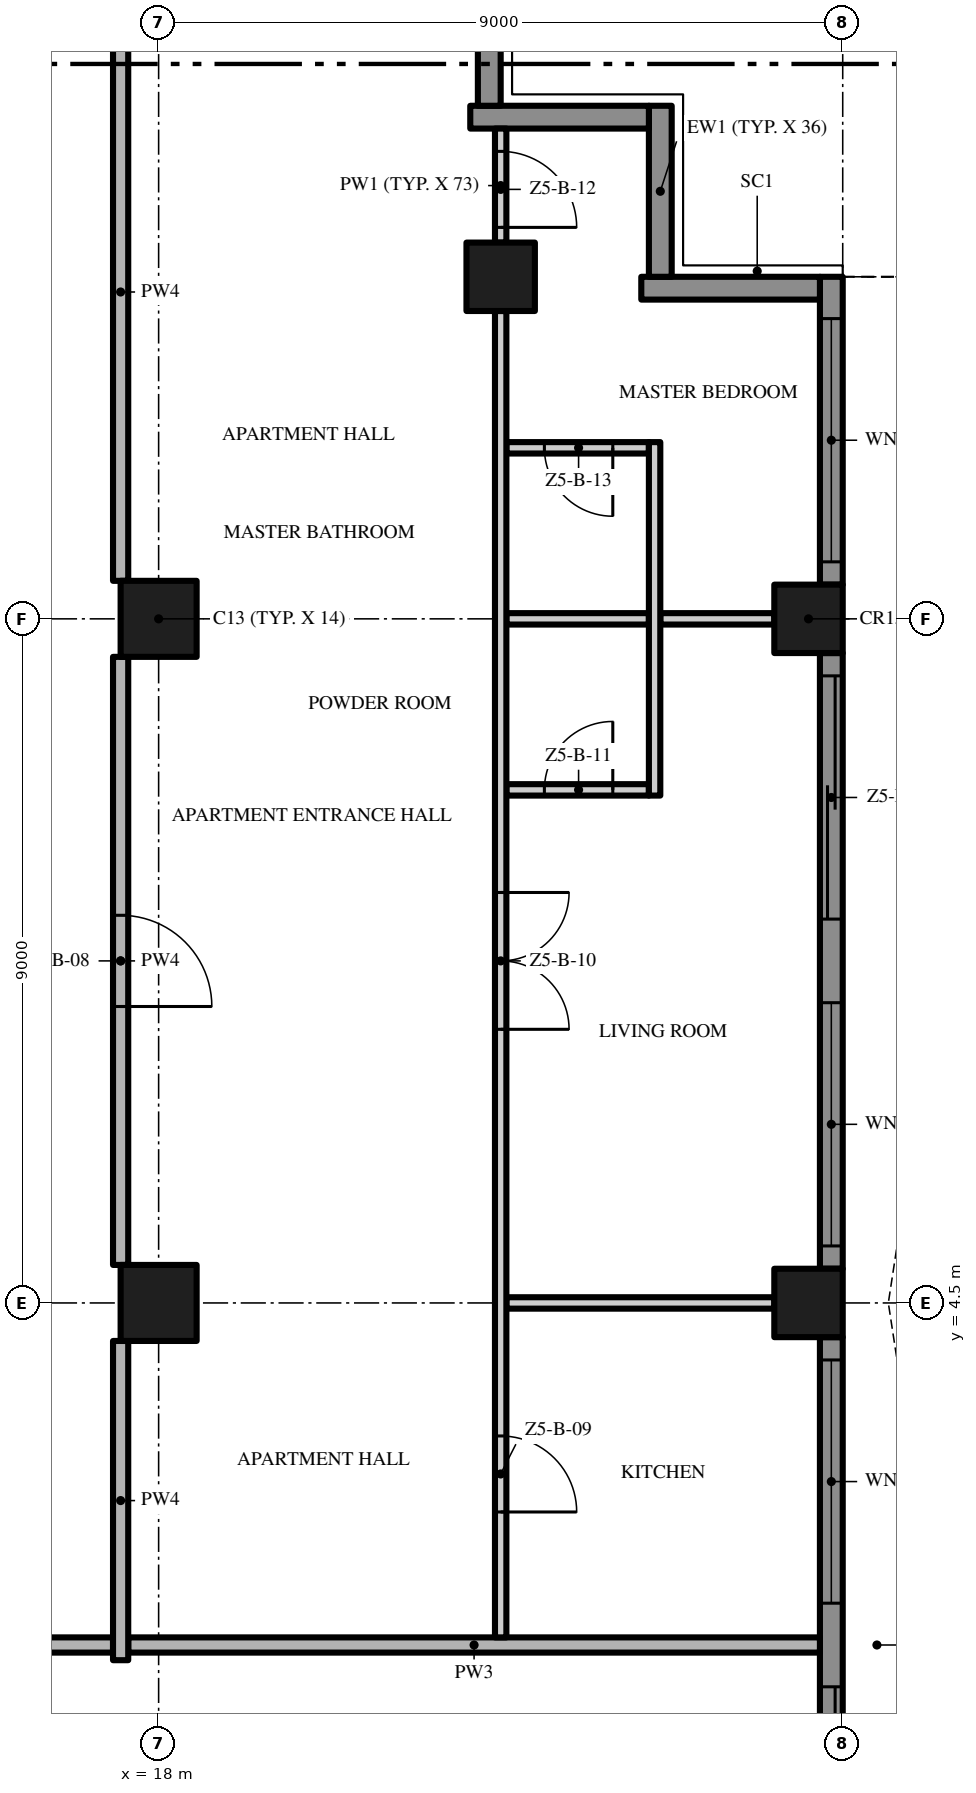
"""IFC4 building model, lengths in metres.
Left out: names, types, materials, properties, quantities, classifications, styles, units other than length and angle.
Written with IfcOpenShell. Run it as: python <this file> out.ifc"""

import sys

from ifc_helpers import new_model, si_unit, direction, frame, frame_2d, origin, origin_2d, place, context, subcontext, project, spatial, polyline, rectangle, outline, extrude, element, fill, save


model = new_model("IFC4")
c1 = context("Model", 3, precision=1e-05, world=origin(), true_north=direction((0.0, 1.0)))
c2 = subcontext(c1, "Body", "Model", "MODEL_VIEW")
j1 = project(units=[si_unit("LENGTHUNIT", "METRE"), si_unit("PLANEANGLEUNIT", "RADIAN")], contexts=[c1])
p1 = place(None, origin())
s1 = spatial("IfcSite", under=j1, at=p1, CompositionType="ELEMENT")
p2 = place(p1, origin())
s2 = spatial("IfcBuilding", under=s1, at=p2, CompositionType="ELEMENT")
p3 = place(p2, frame((0.0, 0.0, 250.2)))
s3 = spatial("IfcBuildingStorey", under=s2, at=p3, CompositionType="ELEMENT", Elevation=250.2)
for number, where, z_axis, x_axis in (
    (1, (18.0, 13.5, 0.0), (0.0, 0.0, 1.0), (1.0, 0.0, 0.0)),
    (2, (18.0, 4.5, 0.0), (0.0, 0.0, 1.0), (1.0, 0.0, 0.0)),
):
    element("IfcColumn", number, at=place(p3, frame(where, z_axis=z_axis, x_axis=x_axis)), inside=s3, PredefinedType="COLUMN", context=c2, shape_type="SweptSolid", body=[
        extrude(rectangle(XDim=1.0, YDim=1.0, at=origin_2d()), origin(), (0.0, 0.0, 1.0), 3.5),
    ])
for number, where, z_axis, x_axis in (
    (3, (26.55, 13.5, 0.0), (0.0, 0.0, 1.0), (1.0, 0.0, 0.0)),
    (4, (22.5, 18.0, 0.0), (0.0, 0.0, 1.0), (1.0, 0.0, 0.0)),
    (5, (26.55, 4.5, 0.0), (0.0, 0.0, 1.0), (1.0, 0.0, 0.0)),
):
    element("IfcColumn", number, at=place(p3, frame(where, z_axis=z_axis, x_axis=x_axis)), inside=s3, PredefinedType="COLUMN", context=c2, shape_type="SweptSolid", body=[
        extrude(rectangle(XDim=0.9, YDim=0.9, at=origin_2d()), origin(), (0.0, 0.0, 1.0), 3.5),
    ])
p4 = place(p3, frame((26.85, 4.05, 0.0), z_axis=(0.0, 0.0, 1.0), x_axis=(0.0, -1.0, 0.0)))
e6 = element("IfcWall", 6, at=p4, inside=s3, PredefinedType="SOLIDWALL", context=c2, shape_type="SweptSolid", body=[
    extrude(rectangle(XDim=8.1, YDim=0.3, at=frame_2d((4.05, 0.0))), origin(), (0.0, 0.0, 1.0), 3.5),
])
p5 = place(p4, frame((4.6, 0.0, 0.0)))
e7 = element("IfcOpeningElement", 7, at=p5, cuts=e6, PredefinedType="OPENING", context=c2, shape_type="SweptSolid", body=[
    extrude(rectangle(XDim=3.2, YDim=2.4, at=frame_2d((1.6, 1.2))), frame((0.0, 0.16, 0.0), z_axis=(0.0, -1.0, 0.0), x_axis=(1.0, 0.0, 0.0)), (0.0, 0.0, 1.0), 0.32),
])
p6 = place(p4, frame((0.3, 0.0, 0.45)))
e8 = element("IfcOpeningElement", 8, at=p6, cuts=e6, PredefinedType="OPENING", context=c2, shape_type="SweptSolid", body=[
    extrude(rectangle(XDim=3.2, YDim=2.65, at=frame_2d((1.6, 1.325))), frame((0.0, 0.16, 0.0), z_axis=(0.0, -1.0, 0.0), x_axis=(1.0, 0.0, 0.0)), (0.0, 0.0, 1.0), 0.32),
])
p7 = place(p3, frame((26.85, 13.05, 0.0), z_axis=(0.0, 0.0, 1.0), x_axis=(0.0, -1.0, 0.0)))
e9 = element("IfcWall", 9, at=p7, inside=s3, PredefinedType="SOLIDWALL", context=c2, shape_type="SweptSolid", body=[
    extrude(rectangle(XDim=8.1, YDim=0.3, at=frame_2d((4.05, 0.0))), origin(), (0.0, 0.0, 1.0), 3.5),
])
p8 = place(p7, frame((4.6, 0.0, 0.45)))
e10 = element("IfcOpeningElement", 10, at=p8, cuts=e9, PredefinedType="OPENING", context=c2, shape_type="SweptSolid", body=[
    extrude(rectangle(XDim=3.2, YDim=2.65, at=frame_2d((1.6, 1.325))), frame((0.0, 0.16, 0.0), z_axis=(0.0, -1.0, 0.0), x_axis=(1.0, 0.0, 0.0)), (0.0, 0.0, 1.0), 0.32),
])
p9 = place(p7, frame((0.3, 0.0, 0.0)))
e11 = element("IfcOpeningElement", 11, at=p9, cuts=e9, PredefinedType="OPENING", context=c2, shape_type="SweptSolid", body=[
    extrude(rectangle(XDim=3.2, YDim=2.4, at=frame_2d((1.6, 1.2))), frame((0.0, 0.16, 0.0), z_axis=(0.0, -1.0, 0.0), x_axis=(1.0, 0.0, 0.0)), (0.0, 0.0, 1.0), 0.32),
])
p10 = place(p3, frame((26.85, 18.0, 0.0), z_axis=(0.0, 0.0, 1.0), x_axis=(0.0, -1.0, 0.0)))
e12 = element("IfcWall", 12, at=p10, inside=s3, PredefinedType="SOLIDWALL", context=c2, shape_type="SweptSolid", body=[
    extrude(rectangle(XDim=4.05, YDim=0.3, at=frame_2d((2.025, 0.0))), origin(), (0.0, 0.0, 1.0), 3.5),
])
p11 = place(p10, frame((0.55, 0.0, 0.45)))
e13 = element("IfcOpeningElement", 13, at=p11, cuts=e12, PredefinedType="OPENING", context=c2, shape_type="SweptSolid", body=[
    extrude(rectangle(XDim=3.2, YDim=2.65, at=frame_2d((1.6, 1.325))), frame((0.0, 0.16, 0.0), z_axis=(0.0, -1.0, 0.0), x_axis=(1.0, 0.0, 0.0)), (0.0, 0.0, 1.0), 0.32),
])
p12 = place(p3, frame((24.35, 17.85, 0.0), z_axis=(0.0, 0.0, 1.0), x_axis=(1.0, 0.0, 0.0)))
e14 = element("IfcWall", 14, at=p12, inside=s3, PredefinedType="SOLIDWALL", context=c2, shape_type="SweptSolid", body=[
    extrude(rectangle(XDim=2.35, YDim=0.3, at=frame_2d((1.175, 0.0))), origin(), (0.0, 0.0, 1.0), 3.5),
])
p13 = place(p3, frame((24.6, 20.25, 0.0), z_axis=(0.0, 0.0, 1.0), x_axis=(0.0, -1.0, 0.0)))
e15 = element("IfcWall", 15, at=p13, inside=s3, PredefinedType="SOLIDWALL", context=c2, shape_type="SweptSolid", body=[
    extrude(rectangle(XDim=2.25, YDim=0.3, at=frame_2d((1.125, 0.0))), origin(), (0.0, 0.0, 1.0), 3.5),
])
p14 = place(p3, frame((22.1, 20.1, 0.0), z_axis=(0.0, 0.0, 1.0), x_axis=(1.0, 0.0, 0.0)))
e16 = element("IfcWall", 16, at=p14, inside=s3, PredefinedType="SOLIDWALL", context=c2, shape_type="SweptSolid", body=[
    extrude(rectangle(XDim=2.35, YDim=0.3, at=frame_2d((1.175, 0.0))), origin(), (0.0, 0.0, 1.0), 3.5),
])
p15 = place(p3, frame((22.35, 22.5, 0.0), z_axis=(0.0, 0.0, 1.0), x_axis=(0.0, -1.0, 0.0)))
e17 = element("IfcWall", 17, at=p15, inside=s3, PredefinedType="SOLIDWALL", context=c2, shape_type="SweptSolid", body=[
    extrude(rectangle(XDim=2.25, YDim=0.3, at=frame_2d((1.125, 0.0))), origin(), (0.0, 0.0, 1.0), 3.5),
])
p16 = place(p3, origin())
e18 = element("IfcWall", 18, at=p16, inside=s3, PredefinedType="USERDEFINED", context=c2, shape_type="SweptSolid", body=[
    extrude(outline(polyline([(30.0, -18.0), (29.771, -16.5), (29.171, -15.0), (28.429, -13.5), (27.829, -12.0), (27.6, -10.5), (27.829, -9.0), (28.429, -7.5), (29.171, -6.0), (29.771, -4.5), (30.0, -3.0), (29.771, -1.5), (29.171, 0.0), (28.429, 1.5), (27.829, 3.0), (27.6, 4.5), (27.829, 6.0), (28.429, 7.5), (29.171, 9.0), (29.771, 10.5), (30.0, 12.0), (29.771, 13.5), (29.171, 15.0), (28.429, 16.5), (27.829, 18.0), (27.597, 17.907), (28.201, 16.398), (28.942, 14.898), (29.528, 13.434), (29.747, 12.0), (29.528, 10.566), (28.942, 9.102), (28.201, 7.602), (27.586, 6.066), (27.347, 4.5), (27.586, 2.934), (28.201, 1.398), (28.942, -0.102), (29.528, -1.566), (29.747, -3.0), (29.528, -4.434), (28.942, -5.898), (28.201, -7.398), (27.586, -8.934), (27.347, -10.5), (27.586, -12.066), (28.201, -13.602), (28.942, -15.102), (29.528, -16.566), (29.753, -18.038), (30.0, -18.0)])), origin(), (0.0, 0.0, 1.0), 0.9),
])
p17 = place(p3, frame((17.4, 0.0, 0.0), z_axis=(0.0, 0.0, 1.0), x_axis=(-1.0, 0.0, 0.0)))
e19 = element("IfcWall", 19, at=p17, inside=s3, PredefinedType="PARTITIONING", context=c2, shape_type="SweptSolid", body=[
    extrude(rectangle(XDim=34.8, YDim=0.2, at=frame_2d((17.4, 0.0))), origin(), (0.0, 0.0, 1.0), 3.5),
])
p18 = place(p17, frame((23.4, 0.0, 0.0)))
e20 = element("IfcOpeningElement", 20, at=p18, cuts=e19, PredefinedType="OPENING", context=c2, shape_type="SweptSolid", body=[
    extrude(rectangle(XDim=1.5, YDim=2.4, at=frame_2d((0.75, 1.2))), frame((0.0, 0.11, 0.0), z_axis=(0.0, -1.0, 0.0), x_axis=(1.0, 0.0, 0.0)), (0.0, 0.0, 1.0), 0.22),
])
p19 = place(p17, frame((5.4, 0.0, 0.0)))
e21 = element("IfcOpeningElement", 21, at=p19, cuts=e19, PredefinedType="OPENING", context=c2, shape_type="SweptSolid", body=[
    extrude(rectangle(XDim=1.5, YDim=2.4, at=frame_2d((0.75, 1.2))), frame((0.0, 0.11, 0.0), z_axis=(0.0, -1.0, 0.0), x_axis=(1.0, 0.0, 0.0)), (0.0, 0.0, 1.0), 0.22),
])
p20 = place(p3, frame((17.6, 0.0, 0.0), z_axis=(0.0, 0.0, 1.0), x_axis=(1.0, 0.0, 0.0)))
e22 = element("IfcWall", 22, at=p20, inside=s3, PredefinedType="PARTITIONING", context=c2, shape_type="SweptSolid", body=[
    extrude(rectangle(XDim=9.1, YDim=0.2, at=frame_2d((4.55, 0.0))), origin(), (0.0, 0.0, 1.0), 3.5),
])
p21 = place(p3, frame((22.575, 4.5, 0.0), z_axis=(0.0, 0.0, 1.0), x_axis=(1.0, 0.0, 0.0)))
e23 = element("IfcWall", 23, at=p21, inside=s3, PredefinedType="PARTITIONING", context=c2, shape_type="SweptSolid", body=[
    extrude(rectangle(XDim=3.525, YDim=0.15, at=frame_2d((1.762, 0.0))), origin(), (0.0, 0.0, 1.0), 3.5),
])
p22 = place(p3, frame((22.575, 11.25, 0.0), z_axis=(0.0, 0.0, 1.0), x_axis=(1.0, 0.0, 0.0)))
e24 = element("IfcWall", 24, at=p22, inside=s3, PredefinedType="PARTITIONING", context=c2, shape_type="SweptSolid", body=[
    extrude(rectangle(XDim=1.875, YDim=0.15, at=frame_2d((0.938, 0.0))), origin(), (0.0, 0.0, 1.0), 3.5),
])
p23 = place(p22, frame((0.5, 0.0, 0.0)))
e25 = element("IfcOpeningElement", 25, at=p23, cuts=e24, PredefinedType="OPENING", context=c2, shape_type="SweptSolid", body=[
    extrude(rectangle(XDim=0.9, YDim=2.1, at=frame_2d((0.45, 1.05))), frame((0.0, 0.085, 0.0), z_axis=(0.0, -1.0, 0.0), x_axis=(1.0, 0.0, 0.0)), (0.0, 0.0, 1.0), 0.17),
])
p24 = place(p3, frame((22.575, 13.5, 0.0), z_axis=(0.0, 0.0, 1.0), x_axis=(1.0, 0.0, 0.0)))
e26 = element("IfcWall", 26, at=p24, inside=s3, PredefinedType="PARTITIONING", context=c2, shape_type="SweptSolid", body=[
    extrude(rectangle(XDim=1.875, YDim=0.15, at=frame_2d((0.938, 0.0))), origin(), (0.0, 0.0, 1.0), 3.5),
])
p25 = place(p3, frame((24.6, 13.5, 0.0), z_axis=(0.0, 0.0, 1.0), x_axis=(1.0, 0.0, 0.0)))
e27 = element("IfcWall", 27, at=p25, inside=s3, PredefinedType="PARTITIONING", context=c2, shape_type="SweptSolid", body=[
    extrude(rectangle(XDim=1.5, YDim=0.15, at=frame_2d((0.75, 0.0))), origin(), (0.0, 0.0, 1.0), 3.5),
])
p26 = place(p3, frame((24.45, 15.75, 0.0), z_axis=(0.0, 0.0, 1.0), x_axis=(-1.0, 0.0, 0.0)))
e28 = element("IfcWall", 28, at=p26, inside=s3, PredefinedType="PARTITIONING", context=c2, shape_type="SweptSolid", body=[
    extrude(rectangle(XDim=1.875, YDim=0.15, at=frame_2d((0.938, 0.0))), origin(), (0.0, 0.0, 1.0), 3.5),
])
p27 = place(p26, frame((0.475, 0.0, 0.0)))
e29 = element("IfcOpeningElement", 29, at=p27, cuts=e28, PredefinedType="OPENING", context=c2, shape_type="SweptSolid", body=[
    extrude(rectangle(XDim=0.9, YDim=2.1, at=frame_2d((0.45, 1.05))), frame((0.0, 0.085, 0.0), z_axis=(0.0, -1.0, 0.0), x_axis=(1.0, 0.0, 0.0)), (0.0, 0.0, 1.0), 0.17),
])
p28 = place(p3, frame((17.5, -0.2, 0.0), z_axis=(0.0, 0.0, 1.0), x_axis=(0.0, 1.0, 0.0)))
e30 = element("IfcWall", 30, at=p28, inside=s3, PredefinedType="PARTITIONING", context=c2, shape_type="SweptSolid", body=[
    extrude(rectangle(XDim=4.2, YDim=0.2, at=frame_2d((2.1, 0.0))), origin(), (0.0, 0.0, 1.0), 3.5),
])
p29 = place(p3, frame((17.5, 13.0, 0.0), z_axis=(0.0, 0.0, 1.0), x_axis=(0.0, -1.0, 0.0)))
e31 = element("IfcWall", 31, at=p29, inside=s3, PredefinedType="PARTITIONING", context=c2, shape_type="SweptSolid", body=[
    extrude(rectangle(XDim=8.0, YDim=0.2, at=frame_2d((4.0, 0.0))), origin(), (0.0, 0.0, 1.0), 3.5),
])
p30 = place(p29, frame((3.4, 0.0, 0.0)))
e32 = element("IfcOpeningElement", 32, at=p30, cuts=e31, PredefinedType="OPENING", context=c2, shape_type="SweptSolid", body=[
    extrude(rectangle(XDim=1.2, YDim=2.4, at=frame_2d((0.6, 1.2))), frame((0.0, 0.11, 0.0), z_axis=(0.0, -1.0, 0.0), x_axis=(1.0, 0.0, 0.0)), (0.0, 0.0, 1.0), 0.22),
])
p31 = place(p3, frame((17.5, 14.0, 0.0), z_axis=(0.0, 0.0, 1.0), x_axis=(0.0, 1.0, 0.0)))
e33 = element("IfcWall", 33, at=p31, inside=s3, PredefinedType="PARTITIONING", context=c2, shape_type="SweptSolid", body=[
    extrude(rectangle(XDim=7.6, YDim=0.2, at=frame_2d((3.8, 0.0))), origin(), (0.0, 0.0, 1.0), 3.5),
])
p32 = place(p3, frame((22.5, 17.55, 0.0), z_axis=(0.0, 0.0, 1.0), x_axis=(0.0, -1.0, 0.0)))
e34 = element("IfcWall", 34, at=p32, inside=s3, PredefinedType="PARTITIONING", context=c2, shape_type="SweptSolid", body=[
    extrude(rectangle(XDim=17.45, YDim=0.15, at=frame_2d((8.725, 0.0))), origin(), (0.0, 0.0, 1.0), 3.5),
])
p33 = place(p32, frame((14.8, 0.0, 0.0)))
e35 = element("IfcOpeningElement", 35, at=p33, cuts=e34, PredefinedType="OPENING", context=c2, shape_type="SweptSolid", body=[
    extrude(rectangle(XDim=1.0, YDim=2.4, at=frame_2d((0.5, 1.2))), frame((0.0, 0.085, 0.0), z_axis=(0.0, -1.0, 0.0), x_axis=(1.0, 0.0, 0.0)), (0.0, 0.0, 1.0), 0.17),
])
p34 = place(p32, frame((7.65, 0.0, 0.0)))
e36 = element("IfcOpeningElement", 36, at=p34, cuts=e34, PredefinedType="OPENING", context=c2, shape_type="SweptSolid", body=[
    extrude(rectangle(XDim=1.8, YDim=2.4, at=frame_2d((0.9, 1.2))), frame((0.0, 0.085, 0.0), z_axis=(0.0, -1.0, 0.0), x_axis=(1.0, 0.0, 0.0)), (0.0, 0.0, 1.0), 0.17),
])
p35 = place(p3, frame((22.5, 19.95, 0.0), z_axis=(0.0, 0.0, 1.0), x_axis=(0.0, -1.0, 0.0)))
e37 = element("IfcWall", 37, at=p35, inside=s3, PredefinedType="PARTITIONING", context=c2, shape_type="SweptSolid", body=[
    extrude(rectangle(XDim=1.5, YDim=0.15, at=frame_2d((0.75, 0.0))), origin(), (0.0, 0.0, 1.0), 3.5),
])
p36 = place(p35, frame((0.3, 0.0, 0.0)))
e38 = element("IfcOpeningElement", 38, at=p36, cuts=e37, PredefinedType="OPENING", context=c2, shape_type="SweptSolid", body=[
    extrude(rectangle(XDim=1.0, YDim=2.4, at=frame_2d((0.5, 1.2))), frame((0.0, 0.085, 0.0), z_axis=(0.0, -1.0, 0.0), x_axis=(1.0, 0.0, 0.0)), (0.0, 0.0, 1.0), 0.17),
])
p37 = place(p3, frame((24.525, 11.175, 0.0), z_axis=(0.0, 0.0, 1.0), x_axis=(0.0, 1.0, 0.0)))
e39 = element("IfcWall", 39, at=p37, inside=s3, PredefinedType="PARTITIONING", context=c2, shape_type="SweptSolid", body=[
    extrude(rectangle(XDim=4.65, YDim=0.15, at=frame_2d((2.325, 0.0))), origin(), (0.0, 0.0, 1.0), 3.5),
])
p38 = place(p5, origin())
e40 = element("IfcDoor", 40, at=p38, inside=s3, OperationType="SINGLE_SWING_LEFT", PredefinedType="DOOR", context=c2, shape_type="SweptSolid", body=[
    extrude(rectangle(XDim=3.2, YDim=2.4, at=frame_2d((1.6, 1.2))), frame((0.0, 0.025, 0.0), z_axis=(0.0, -1.0, 0.0), x_axis=(1.0, 0.0, 0.0)), (0.0, 0.0, 1.0), 0.05),
])
fill(e7, e40)
p39 = place(p6, origin())
e41 = element("IfcWindow", 41, at=p39, inside=s3, PartitioningType="SINGLE_PANEL", PredefinedType="WINDOW", context=c2, shape_type="SweptSolid", body=[
    extrude(rectangle(XDim=3.2, YDim=2.65, at=frame_2d((1.6, 1.325))), frame((0.0, 0.03, 0.0), z_axis=(0.0, -1.0, 0.0), x_axis=(1.0, 0.0, 0.0)), (0.0, 0.0, 1.0), 0.06),
])
fill(e8, e41)
p40 = place(p8, origin())
e42 = element("IfcWindow", 42, at=p40, inside=s3, PartitioningType="SINGLE_PANEL", PredefinedType="WINDOW", context=c2, shape_type="SweptSolid", body=[
    extrude(rectangle(XDim=3.2, YDim=2.65, at=frame_2d((1.6, 1.325))), frame((0.0, 0.03, 0.0), z_axis=(0.0, -1.0, 0.0), x_axis=(1.0, 0.0, 0.0)), (0.0, 0.0, 1.0), 0.06),
])
fill(e10, e42)
p41 = place(p9, origin())
e43 = element("IfcDoor", 43, at=p41, inside=s3, OperationType="SINGLE_SWING_LEFT", PredefinedType="DOOR", context=c2, shape_type="SweptSolid", body=[
    extrude(rectangle(XDim=3.2, YDim=2.4, at=frame_2d((1.6, 1.2))), frame((0.0, 0.025, 0.0), z_axis=(0.0, -1.0, 0.0), x_axis=(1.0, 0.0, 0.0)), (0.0, 0.0, 1.0), 0.05),
])
fill(e11, e43)
p42 = place(p11, origin())
e44 = element("IfcWindow", 44, at=p42, inside=s3, PartitioningType="SINGLE_PANEL", PredefinedType="WINDOW", context=c2, shape_type="SweptSolid", body=[
    extrude(rectangle(XDim=3.2, YDim=2.65, at=frame_2d((1.6, 1.325))), frame((0.0, 0.03, 0.0), z_axis=(0.0, -1.0, 0.0), x_axis=(1.0, 0.0, 0.0)), (0.0, 0.0, 1.0), 0.06),
])
fill(e13, e44)
p43 = place(p30, origin())
e45 = element("IfcDoor", 45, at=p43, inside=s3, OperationType="SINGLE_SWING_RIGHT", PredefinedType="DOOR", context=c2, shape_type="SweptSolid", body=[
    extrude(rectangle(XDim=1.2, YDim=2.4, at=frame_2d((0.6, 1.2))), frame((0.0, 0.025, 0.0), z_axis=(0.0, -1.0, 0.0), x_axis=(1.0, 0.0, 0.0)), (0.0, 0.0, 1.0), 0.05),
])
fill(e32, e45)
p44 = place(p33, origin())
e46 = element("IfcDoor", 46, at=p44, inside=s3, OperationType="SINGLE_SWING_RIGHT", PredefinedType="DOOR", context=c2, shape_type="SweptSolid", body=[
    extrude(rectangle(XDim=1.0, YDim=2.4, at=frame_2d((0.5, 1.2))), frame((0.0, 0.025, 0.0), z_axis=(0.0, -1.0, 0.0), x_axis=(1.0, 0.0, 0.0)), (0.0, 0.0, 1.0), 0.05),
])
fill(e35, e46)
p45 = place(p34, origin())
e47 = element("IfcDoor", 47, at=p45, inside=s3, OperationType="DOUBLE_DOOR_SINGLE_SWING", PredefinedType="DOOR", context=c2, shape_type="SweptSolid", body=[
    extrude(rectangle(XDim=1.8, YDim=2.4, at=frame_2d((0.9, 1.2))), frame((0.0, 0.025, 0.0), z_axis=(0.0, -1.0, 0.0), x_axis=(1.0, 0.0, 0.0)), (0.0, 0.0, 1.0), 0.05),
])
fill(e36, e47)
p46 = place(p23, origin())
e48 = element("IfcDoor", 48, at=p46, inside=s3, OperationType="SINGLE_SWING_RIGHT", PredefinedType="DOOR", context=c2, shape_type="SweptSolid", body=[
    extrude(rectangle(XDim=0.9, YDim=2.1, at=frame_2d((0.45, 1.05))), frame((0.0, 0.025, 0.0), z_axis=(0.0, -1.0, 0.0), x_axis=(1.0, 0.0, 0.0)), (0.0, 0.0, 1.0), 0.05),
])
fill(e25, e48)
p47 = place(p36, origin())
e49 = element("IfcDoor", 49, at=p47, inside=s3, OperationType="SINGLE_SWING_RIGHT", PredefinedType="DOOR", context=c2, shape_type="SweptSolid", body=[
    extrude(rectangle(XDim=1.0, YDim=2.4, at=frame_2d((0.5, 1.2))), frame((0.0, 0.025, 0.0), z_axis=(0.0, -1.0, 0.0), x_axis=(1.0, 0.0, 0.0)), (0.0, 0.0, 1.0), 0.05),
])
fill(e38, e49)
p48 = place(p27, origin())
e50 = element("IfcDoor", 50, at=p48, inside=s3, OperationType="SINGLE_SWING_LEFT", PredefinedType="DOOR", context=c2, shape_type="SweptSolid", body=[
    extrude(rectangle(XDim=0.9, YDim=2.1, at=frame_2d((0.45, 1.05))), frame((0.0, 0.025, 0.0), z_axis=(0.0, -1.0, 0.0), x_axis=(1.0, 0.0, 0.0)), (0.0, 0.0, 1.0), 0.05),
])
fill(e29, e50)
save(model, sys.argv[1])
